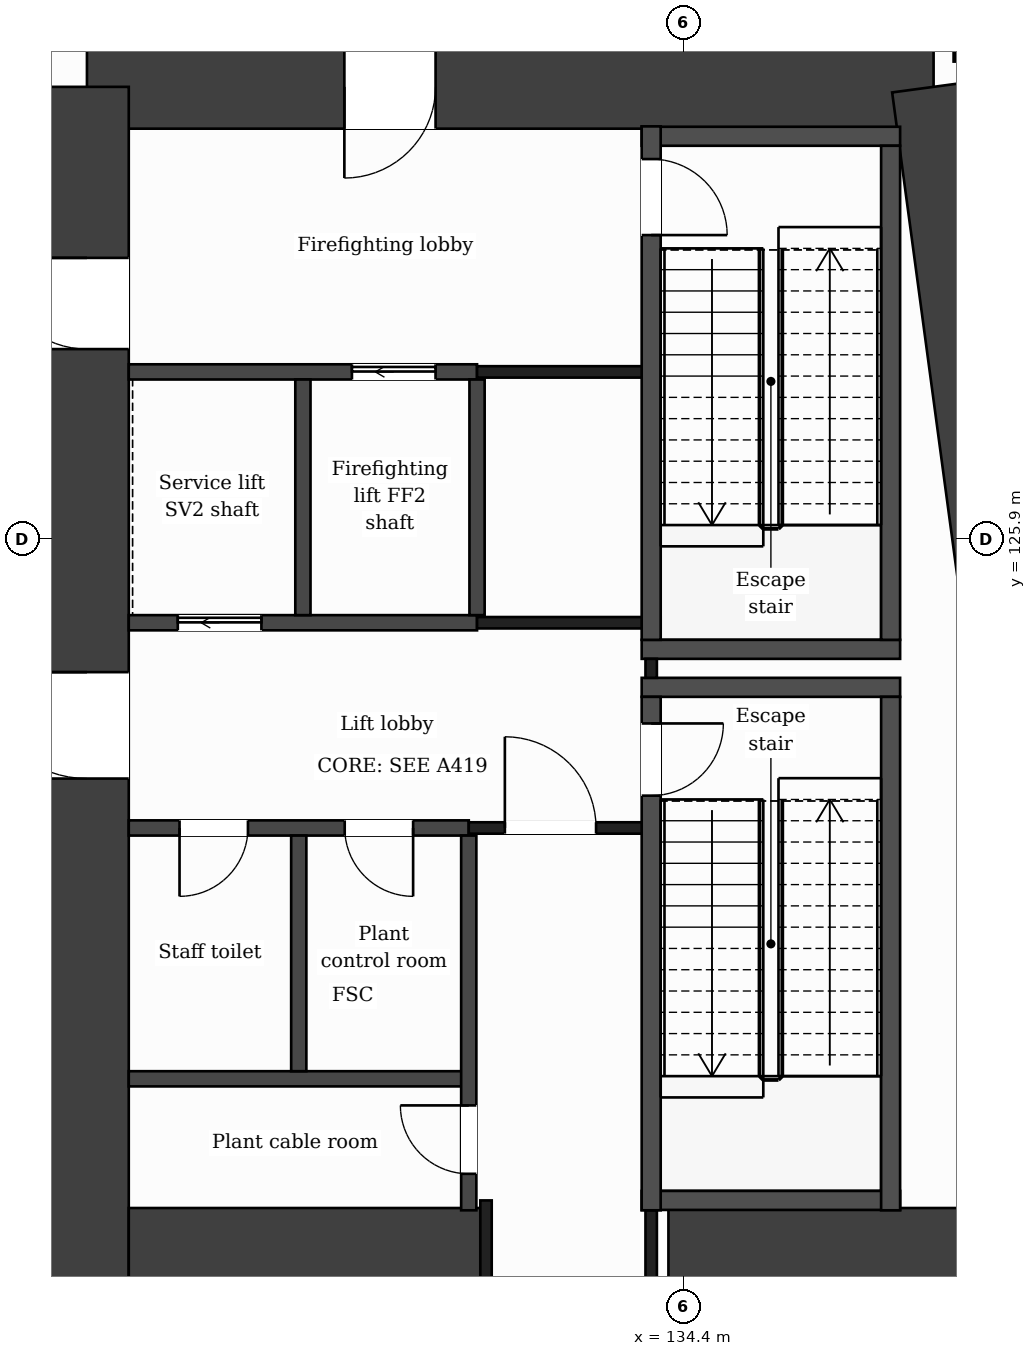
"""IFC4 building model, lengths in metres.
Left out: names, types, materials, properties, quantities, classifications, styles, units other than length and angle.
Written with IfcOpenShell. Run it as: python <this file> out.ifc"""

import sys

from ifc_helpers import new_model, si_unit, direction, frame, frame_2d, origin, place, context, subcontext, project, spatial, rectangle, extrude, element, fill, save


model = new_model("IFC4")
c1 = context("Model", 3, precision=1e-05, world=origin(), true_north=direction((0.0, 1.0)))
c2 = subcontext(c1, "Body", "Model", "MODEL_VIEW")
j1 = project(units=[si_unit("LENGTHUNIT", "METRE"), si_unit("PLANEANGLEUNIT", "RADIAN")], contexts=[c1])
p1 = place(None, origin())
s1 = spatial("IfcSite", under=j1, at=p1, CompositionType="ELEMENT")
p2 = place(p1, origin())
s2 = spatial("IfcBuilding", under=s1, at=p2, CompositionType="ELEMENT")
p3 = place(p2, frame((0.0, 0.0, 81.0)))
s3 = spatial("IfcBuildingStorey", under=s2, at=p3, CompositionType="ELEMENT", Elevation=81.0)
p4 = place(p3, frame((126.55, 131.85, 0.0), z_axis=(0.0, 0.0, 1.0), x_axis=(1.0, 0.0, 0.0)))
e1 = element("IfcWall", 1, at=p4, inside=s3, PredefinedType="SHEAR", context=c2, shape_type="SweptSolid", body=[
    extrude(rectangle(XDim=11.138, YDim=1.1, at=frame_2d((5.569, 0.0))), origin(), (0.0, 0.0, 1.0), 5.0),
])
p5 = place(p4, frame((3.386, 0.0, 0.0)))
e2 = element("IfcOpeningElement", 2, at=p5, cuts=e1, PredefinedType="OPENING", context=c2, shape_type="SweptSolid", body=[
    extrude(rectangle(XDim=1.2, YDim=2.1, at=frame_2d((0.6, 1.05))), frame((0.0, 0.56, 0.0), z_axis=(0.0, -1.0, 0.0), x_axis=(1.0, 0.0, 0.0)), (0.0, 0.0, 1.0), 1.12),
])
p6 = place(p3, frame((137.688, 131.85, 0.0), z_axis=(0.0, 0.0, 1.0), x_axis=(0.133411793472, -0.991060691059, 0.0)))
e3 = element("IfcWall", 3, at=p6, inside=s3, PredefinedType="SHEAR", context=c2, shape_type="SweptSolid", body=[
    extrude(rectangle(XDim=21.089, YDim=1.1, at=frame_2d((10.544, 0.0))), origin(), (0.0, 0.0, 1.0), 5.0),
])
p7 = place(p3, frame((126.55, 110.95, 0.0), z_axis=(0.0, 0.0, 1.0), x_axis=(0.0, 1.0, 0.0)))
e4 = element("IfcWall", 4, at=p7, inside=s3, PredefinedType="SHEAR", context=c2, shape_type="SweptSolid", body=[
    extrude(rectangle(XDim=20.9, YDim=1.1, at=frame_2d((10.45, 0.0))), origin(), (0.0, 0.0, 1.0), 5.0),
])
p8 = place(p7, frame((17.45, 0.0, 0.0)))
e5 = element("IfcOpeningElement", 5, at=p8, cuts=e4, PredefinedType="OPENING", context=c2, shape_type="SweptSolid", body=[
    extrude(rectangle(XDim=1.2, YDim=2.1, at=frame_2d((0.6, 1.05))), frame((0.0, 0.56, 0.0), z_axis=(0.0, -1.0, 0.0), x_axis=(1.0, 0.0, 0.0)), (0.0, 0.0, 1.0), 1.12),
])
p9 = place(p7, frame((11.8, 0.0, 0.0)))
e6 = element("IfcOpeningElement", 6, at=p9, cuts=e4, PredefinedType="OPENING", context=c2, shape_type="SweptSolid", body=[
    extrude(rectangle(XDim=1.4, YDim=2.1, at=frame_2d((0.7, 1.05))), frame((0.0, 0.56, 0.0), z_axis=(0.0, -1.0, 0.0), x_axis=(1.0, 0.0, 0.0)), (0.0, 0.0, 1.0), 1.12),
])
p10 = place(p3, frame((127.1, 116.55, 0.0), z_axis=(0.0, 0.0, 1.0), x_axis=(1.0, 0.0, 0.0)))
e7 = element("IfcWall", 7, at=p10, inside=s3, PredefinedType="SHEAR", context=c2, shape_type="SweptSolid", body=[
    extrude(rectangle(XDim=4.7, YDim=1.1, at=frame_2d((2.35, 0.0))), origin(), (0.0, 0.0, 1.0), 5.0),
])
p11 = place(p3, frame((134.2, 116.55, 0.0), z_axis=(0.0, 0.0, 1.0), x_axis=(1.0, 0.0, 0.0)))
e8 = element("IfcWall", 8, at=p11, inside=s3, PredefinedType="SHEAR", context=c2, shape_type="SweptSolid", body=[
    extrude(rectangle(XDim=5.077, YDim=1.1, at=frame_2d((2.539, 0.0))), origin(), (0.0, 0.0, 1.0), 5.0),
])
p12 = place(p3, frame((133.848, 117.2, 0.0), z_axis=(0.0, 0.0, 1.0), x_axis=(1.0, 0.0, 0.0)))
e9 = element("IfcWall", 9, at=p12, inside=s3, PredefinedType="PARTITIONING", context=c2, shape_type="SweptSolid", body=[
    extrude(rectangle(XDim=3.4, YDim=0.25, at=frame_2d((1.7, 0.0))), origin(), (0.0, 0.0, 1.0), 4.55),
])
p13 = place(p3, frame((127.1, 118.8, 0.0), z_axis=(0.0, 0.0, 1.0), x_axis=(1.0, 0.0, 0.0)))
e10 = element("IfcWall", 10, at=p13, inside=s3, PredefinedType="PARTITIONING", context=c2, shape_type="SweptSolid", body=[
    extrude(rectangle(XDim=4.473, YDim=0.2, at=frame_2d((2.236, 0.0))), origin(), (0.0, 0.0, 1.0), 4.55),
])
p14 = place(p3, frame((127.1, 122.1, 0.0), z_axis=(0.0, 0.0, 1.0), x_axis=(1.0, 0.0, 0.0)))
e11 = element("IfcWall", 11, at=p14, inside=s3, PredefinedType="PARTITIONING", context=c2, shape_type="SweptSolid", body=[
    extrude(rectangle(XDim=4.473, YDim=0.2, at=frame_2d((2.236, 0.0))), origin(), (0.0, 0.0, 1.0), 4.55),
])
p15 = place(p14, frame((2.841, 0.0, 0.0)))
e12 = element("IfcOpeningElement", 12, at=p15, cuts=e11, PredefinedType="OPENING", context=c2, shape_type="SweptSolid", body=[
    extrude(rectangle(XDim=0.9, YDim=2.1, at=frame_2d((0.45, 1.05))), frame((0.0, 0.11, 0.0), z_axis=(0.0, -1.0, 0.0), x_axis=(1.0, 0.0, 0.0)), (0.0, 0.0, 1.0), 0.22),
])
p16 = place(p14, frame((0.668, 0.0, 0.0)))
e13 = element("IfcOpeningElement", 13, at=p16, cuts=e11, PredefinedType="OPENING", context=c2, shape_type="SweptSolid", body=[
    extrude(rectangle(XDim=0.9, YDim=2.1, at=frame_2d((0.45, 1.05))), frame((0.0, 0.11, 0.0), z_axis=(0.0, -1.0, 0.0), x_axis=(1.0, 0.0, 0.0)), (0.0, 0.0, 1.0), 0.22),
])
p17 = place(p3, frame((131.573, 122.1, 0.0), z_axis=(0.0, 0.0, 1.0), x_axis=(1.0, 0.0, 0.0)))
e14 = element("IfcWall", 14, at=p17, inside=s3, PredefinedType="PARTITIONING", context=c2, shape_type="SweptSolid", body=[
    extrude(rectangle(XDim=2.4, YDim=0.15, at=frame_2d((1.2, 0.0))), origin(), (0.0, 0.0, 1.0), 4.55),
])
p18 = place(p17, frame((0.475, 0.0, 0.0)))
e15 = element("IfcOpeningElement", 15, at=p18, cuts=e14, PredefinedType="OPENING", context=c2, shape_type="SweptSolid", body=[
    extrude(rectangle(XDim=1.2, YDim=2.1, at=frame_2d((0.6, 1.05))), frame((0.0, 0.085, 0.0), z_axis=(0.0, -1.0, 0.0), x_axis=(1.0, 0.0, 0.0)), (0.0, 0.0, 1.0), 0.17),
])
for number, where, z_axis, x_axis in (
    (16, (133.848, 123.95, 0.0), (0.0, 0.0, 1.0), (1.0, 0.0, 0.0)),
    (17, (133.848, 124.45, 0.0), (0.0, 0.0, 1.0), (1.0, 0.0, 0.0)),
):
    element("IfcWall", number, at=place(p3, frame(where, z_axis=z_axis, x_axis=x_axis)), inside=s3, PredefinedType="PARTITIONING", context=c2, shape_type="SweptSolid", body=[
        extrude(rectangle(XDim=3.4, YDim=0.25, at=frame_2d((1.7, 0.0))), origin(), (0.0, 0.0, 1.0), 4.55),
    ])
p19 = place(p3, frame((127.1, 124.8, 0.0), z_axis=(0.0, 0.0, 1.0), x_axis=(1.0, 0.0, 0.0)))
e18 = element("IfcWall", 18, at=p19, inside=s3, PredefinedType="PARTITIONING", context=c2, shape_type="SweptSolid", body=[
    extrude(rectangle(XDim=4.582, YDim=0.2, at=frame_2d((2.291, 0.0))), origin(), (0.0, 0.0, 1.0), 4.55),
])
p20 = place(p19, frame((0.645, 0.0, 0.0)))
e19 = element("IfcOpeningElement", 19, at=p20, cuts=e18, PredefinedType="OPENING", context=c2, shape_type="SweptSolid", body=[
    extrude(rectangle(XDim=1.1, YDim=2.1, at=frame_2d((0.55, 1.05))), frame((0.0, 0.11, 0.0), z_axis=(0.0, -1.0, 0.0), x_axis=(1.0, 0.0, 0.0)), (0.0, 0.0, 1.0), 0.22),
])
p21 = place(p3, frame((131.682, 124.8, 0.0), z_axis=(0.0, 0.0, 1.0), x_axis=(1.0, 0.0, 0.0)))
e20 = element("IfcWall", 20, at=p21, inside=s3, PredefinedType="PARTITIONING", context=c2, shape_type="SweptSolid", body=[
    extrude(rectangle(XDim=2.416, YDim=0.15, at=frame_2d((1.208, 0.0))), origin(), (0.0, 0.0, 1.0), 4.55),
])
p22 = place(p3, frame((127.1, 128.1, 0.0), z_axis=(0.0, 0.0, 1.0), x_axis=(1.0, 0.0, 0.0)))
e21 = element("IfcWall", 21, at=p22, inside=s3, PredefinedType="PARTITIONING", context=c2, shape_type="SweptSolid", body=[
    extrude(rectangle(XDim=4.582, YDim=0.2, at=frame_2d((2.291, 0.0))), origin(), (0.0, 0.0, 1.0), 4.55),
])
p23 = place(p22, frame((2.936, 0.0, 0.0)))
e22 = element("IfcOpeningElement", 22, at=p23, cuts=e21, PredefinedType="OPENING", context=c2, shape_type="SweptSolid", body=[
    extrude(rectangle(XDim=1.1, YDim=2.1, at=frame_2d((0.55, 1.05))), frame((0.0, 0.11, 0.0), z_axis=(0.0, -1.0, 0.0), x_axis=(1.0, 0.0, 0.0)), (0.0, 0.0, 1.0), 0.22),
])
p24 = place(p3, frame((131.682, 128.1, 0.0), z_axis=(0.0, 0.0, 1.0), x_axis=(1.0, 0.0, 0.0)))
e23 = element("IfcWall", 23, at=p24, inside=s3, PredefinedType="PARTITIONING", context=c2, shape_type="SweptSolid", body=[
    extrude(rectangle(XDim=2.291, YDim=0.15, at=frame_2d((1.146, 0.0))), origin(), (0.0, 0.0, 1.0), 4.55),
])
p25 = place(p3, frame((133.848, 131.2, 0.0), z_axis=(0.0, 0.0, 1.0), x_axis=(1.0, 0.0, 0.0)))
e24 = element("IfcWall", 24, at=p25, inside=s3, PredefinedType="PARTITIONING", context=c2, shape_type="SweptSolid", body=[
    extrude(rectangle(XDim=3.4, YDim=0.25, at=frame_2d((1.7, 0.0))), origin(), (0.0, 0.0, 1.0), 4.55),
])
for number, where, z_axis, x_axis in (
    (25, (129.336, 118.9, 0.0), (0.0, 0.0, 1.0), (0.0, 1.0, 0.0)),
    (26, (129.391, 124.9, 0.0), (0.0, 0.0, 1.0), (0.0, 1.0, 0.0)),
):
    element("IfcWall", number, at=place(p3, frame(where, z_axis=z_axis, x_axis=x_axis)), inside=s3, PredefinedType="PARTITIONING", context=c2, shape_type="SweptSolid", body=[
        extrude(rectangle(XDim=3.1, YDim=0.2, at=frame_2d((1.55, 0.0))), origin(), (0.0, 0.0, 1.0), 4.55),
    ])
p26 = place(p3, frame((131.573, 117.07, 0.0), z_axis=(0.0, 0.0, 1.0), x_axis=(0.0, 1.0, 0.0)))
e27 = element("IfcWall", 27, at=p26, inside=s3, PredefinedType="PARTITIONING", context=c2, shape_type="SweptSolid", body=[
    extrude(rectangle(XDim=4.93, YDim=0.2, at=frame_2d((2.465, 0.0))), origin(), (0.0, 0.0, 1.0), 4.55),
])
p27 = place(p26, frame((0.48, 0.0, 0.0)))
e28 = element("IfcOpeningElement", 28, at=p27, cuts=e27, PredefinedType="OPENING", context=c2, shape_type="SweptSolid", body=[
    extrude(rectangle(XDim=0.9, YDim=2.1, at=frame_2d((0.45, 1.05))), frame((0.0, 0.11, 0.0), z_axis=(0.0, -1.0, 0.0), x_axis=(1.0, 0.0, 0.0)), (0.0, 0.0, 1.0), 0.22),
])
p28 = place(p3, frame((131.682, 124.9, 0.0), z_axis=(0.0, 0.0, 1.0), x_axis=(0.0, 1.0, 0.0)))
e29 = element("IfcWall", 29, at=p28, inside=s3, PredefinedType="PARTITIONING", context=c2, shape_type="SweptSolid", body=[
    extrude(rectangle(XDim=3.1, YDim=0.2, at=frame_2d((1.55, 0.0))), origin(), (0.0, 0.0, 1.0), 4.55),
])
p29 = place(p3, frame((131.8, 116.0, 0.0), z_axis=(0.0, 0.0, 1.0), x_axis=(0.0, 1.0, 0.0)))
e30 = element("IfcWall", 30, at=p29, inside=s3, PredefinedType="PARTITIONING", context=c2, shape_type="SweptSolid", body=[
    extrude(rectangle(XDim=1.2, YDim=0.15, at=frame_2d((0.6, 0.0))), origin(), (0.0, 0.0, 1.0), 4.55),
])
p30 = place(p3, frame((133.973, 116.0, 0.0), z_axis=(0.0, 0.0, 1.0), x_axis=(0.0, 1.0, 0.0)))
e31 = element("IfcWall", 31, at=p30, inside=s3, PredefinedType="PARTITIONING", context=c2, shape_type="SweptSolid", body=[
    extrude(rectangle(XDim=1.07, YDim=0.15, at=frame_2d((0.535, 0.0))), origin(), (0.0, 0.0, 1.0), 4.55),
])
p31 = place(p3, frame((133.973, 124.075, 0.0), z_axis=(0.0, 0.0, 1.0), x_axis=(0.0, 1.0, 0.0)))
e32 = element("IfcWall", 32, at=p31, inside=s3, PredefinedType="PARTITIONING", context=c2, shape_type="SweptSolid", body=[
    extrude(rectangle(XDim=0.25, YDim=0.15, at=frame_2d((0.125, 0.0))), origin(), (0.0, 0.0, 1.0), 4.55),
])
p32 = place(p3, frame((133.973, 117.07, 0.0), z_axis=(0.0, 0.0, 1.0), x_axis=(0.0, 1.0, 0.0)))
e33 = element("IfcWall", 33, at=p32, inside=s3, PredefinedType="PARTITIONING", context=c2, shape_type="SweptSolid", body=[
    extrude(rectangle(XDim=6.755, YDim=0.25, at=frame_2d((3.377, 0.0))), origin(), (0.0, 0.0, 1.0), 4.55),
])
p33 = place(p32, frame((5.455, 0.0, 0.0)))
e34 = element("IfcOpeningElement", 34, at=p33, cuts=e33, PredefinedType="OPENING", context=c2, shape_type="SweptSolid", body=[
    extrude(rectangle(XDim=0.95, YDim=2.1, at=frame_2d((0.475, 1.05))), frame((0.0, 0.135, 0.0), z_axis=(0.0, -1.0, 0.0), x_axis=(1.0, 0.0, 0.0)), (0.0, 0.0, 1.0), 0.27),
])
p34 = place(p3, frame((133.973, 124.575, 0.0), z_axis=(0.0, 0.0, 1.0), x_axis=(0.0, 1.0, 0.0)))
e35 = element("IfcWall", 35, at=p34, inside=s3, PredefinedType="PARTITIONING", context=c2, shape_type="SweptSolid", body=[
    extrude(rectangle(XDim=6.755, YDim=0.25, at=frame_2d((3.377, 0.0))), origin(), (0.0, 0.0, 1.0), 4.55),
])
p35 = place(p34, frame((5.325, 0.0, 0.0)))
e36 = element("IfcOpeningElement", 36, at=p35, cuts=e35, PredefinedType="OPENING", context=c2, shape_type="SweptSolid", body=[
    extrude(rectangle(XDim=1.0, YDim=2.1, at=frame_2d((0.5, 1.05))), frame((0.0, 0.135, 0.0), z_axis=(0.0, -1.0, 0.0), x_axis=(1.0, 0.0, 0.0)), (0.0, 0.0, 1.0), 0.27),
])
p36 = place(p3, frame((137.123, 117.07, 0.0), z_axis=(0.0, 0.0, 1.0), x_axis=(0.0, 1.0, 0.0)))
e37 = element("IfcWall", 37, at=p36, inside=s3, PredefinedType="PARTITIONING", context=c2, shape_type="SweptSolid", body=[
    extrude(rectangle(XDim=6.755, YDim=0.25, at=frame_2d((3.377, 0.0))), origin(), (0.0, 0.0, 1.0), 4.55),
])
p37 = place(p3, frame((137.123, 124.575, 0.0), z_axis=(0.0, 0.0, 1.0), x_axis=(0.0, 1.0, 0.0)))
e38 = element("IfcWall", 38, at=p37, inside=s3, PredefinedType="PARTITIONING", context=c2, shape_type="SweptSolid", body=[
    extrude(rectangle(XDim=6.5, YDim=0.25, at=frame_2d((3.25, 0.0))), origin(), (0.0, 0.0, 1.0), 4.55),
])
p38 = place(p18, origin())
e39 = element("IfcDoor", 39, at=p38, inside=s3, OperationType="SINGLE_SWING_LEFT", PredefinedType="DOOR", context=c2, shape_type="SweptSolid", body=[
    extrude(rectangle(XDim=1.2, YDim=2.1, at=frame_2d((0.6, 1.05))), frame((0.0, 0.025, 0.0), z_axis=(0.0, -1.0, 0.0), x_axis=(1.0, 0.0, 0.0)), (0.0, 0.0, 1.0), 0.05),
])
fill(e15, e39)
p39 = place(p23, origin())
e40 = element("IfcDoor", 40, at=p39, inside=s3, OperationType="SLIDING_TO_LEFT", PredefinedType="DOOR", context=c2, shape_type="SweptSolid", body=[
    extrude(rectangle(XDim=1.1, YDim=2.1, at=frame_2d((0.55, 1.05))), frame((0.0, 0.025, 0.0), z_axis=(0.0, -1.0, 0.0), x_axis=(1.0, 0.0, 0.0)), (0.0, 0.0, 1.0), 0.05),
])
fill(e22, e40)
p40 = place(p20, origin())
e41 = element("IfcDoor", 41, at=p40, inside=s3, OperationType="SLIDING_TO_LEFT", PredefinedType="DOOR", context=c2, shape_type="SweptSolid", body=[
    extrude(rectangle(XDim=1.1, YDim=2.1, at=frame_2d((0.55, 1.05))), frame((0.0, 0.025, 0.0), z_axis=(0.0, -1.0, 0.0), x_axis=(1.0, 0.0, 0.0)), (0.0, 0.0, 1.0), 0.05),
])
fill(e19, e41)
p41 = place(p15, origin())
e42 = element("IfcDoor", 42, at=p41, inside=s3, OperationType="SINGLE_SWING_RIGHT", PredefinedType="DOOR", context=c2, shape_type="SweptSolid", body=[
    extrude(rectangle(XDim=0.9, YDim=2.1, at=frame_2d((0.45, 1.05))), frame((0.0, 0.025, 0.0), z_axis=(0.0, -1.0, 0.0), x_axis=(1.0, 0.0, 0.0)), (0.0, 0.0, 1.0), 0.05),
])
fill(e12, e42)
p42 = place(p16, origin())
e43 = element("IfcDoor", 43, at=p42, inside=s3, OperationType="SINGLE_SWING_LEFT", PredefinedType="DOOR", context=c2, shape_type="SweptSolid", body=[
    extrude(rectangle(XDim=0.9, YDim=2.1, at=frame_2d((0.45, 1.05))), frame((0.0, 0.025, 0.0), z_axis=(0.0, -1.0, 0.0), x_axis=(1.0, 0.0, 0.0)), (0.0, 0.0, 1.0), 0.05),
])
fill(e13, e43)
p43 = place(p33, origin())
e44 = element("IfcDoor", 44, at=p43, inside=s3, OperationType="SINGLE_SWING_RIGHT", PredefinedType="DOOR", context=c2, shape_type="SweptSolid", body=[
    extrude(rectangle(XDim=0.95, YDim=2.1, at=frame_2d((0.475, 1.05))), frame((0.0, 0.025, 0.0), z_axis=(0.0, -1.0, 0.0), x_axis=(1.0, 0.0, 0.0)), (0.0, 0.0, 1.0), 0.05),
])
fill(e34, e44)
p44 = place(p35, origin())
e45 = element("IfcDoor", 45, at=p44, inside=s3, OperationType="SINGLE_SWING_LEFT", PredefinedType="DOOR", context=c2, shape_type="SweptSolid", body=[
    extrude(rectangle(XDim=1.0, YDim=2.1, at=frame_2d((0.5, 1.05))), frame((0.0, 0.025, 0.0), z_axis=(0.0, -1.0, 0.0), x_axis=(1.0, 0.0, 0.0)), (0.0, 0.0, 1.0), 0.05),
])
fill(e36, e45)
p45 = place(p27, origin())
e46 = element("IfcDoor", 46, at=p45, inside=s3, OperationType="SINGLE_SWING_RIGHT", PredefinedType="DOOR", context=c2, shape_type="SweptSolid", body=[
    extrude(rectangle(XDim=0.9, YDim=2.1, at=frame_2d((0.45, 1.05))), frame((0.0, 0.025, 0.0), z_axis=(0.0, -1.0, 0.0), x_axis=(1.0, 0.0, 0.0)), (0.0, 0.0, 1.0), 0.05),
])
fill(e28, e46)
p46 = place(p8, origin())
e47 = element("IfcDoor", 47, at=p46, inside=s3, OperationType="SINGLE_SWING_RIGHT", PredefinedType="DOOR", context=c2, shape_type="SweptSolid", body=[
    extrude(rectangle(XDim=1.2, YDim=2.1, at=frame_2d((0.6, 1.05))), frame((0.0, 0.025, 0.0), z_axis=(0.0, -1.0, 0.0), x_axis=(1.0, 0.0, 0.0)), (0.0, 0.0, 1.0), 0.05),
])
fill(e5, e47)
p47 = place(p5, origin())
e48 = element("IfcDoor", 48, at=p47, inside=s3, OperationType="SINGLE_SWING_LEFT", PredefinedType="DOOR", context=c2, shape_type="SweptSolid", body=[
    extrude(rectangle(XDim=1.2, YDim=2.1, at=frame_2d((0.6, 1.05))), frame((0.0, 0.025, 0.0), z_axis=(0.0, -1.0, 0.0), x_axis=(1.0, 0.0, 0.0)), (0.0, 0.0, 1.0), 0.05),
])
fill(e2, e48)
p48 = place(p9, origin())
e49 = element("IfcDoor", 49, at=p48, inside=s3, OperationType="SINGLE_SWING_RIGHT", PredefinedType="DOOR", context=c2, shape_type="SweptSolid", body=[
    extrude(rectangle(XDim=1.4, YDim=2.1, at=frame_2d((0.7, 1.05))), frame((0.0, 0.025, 0.0), z_axis=(0.0, -1.0, 0.0), x_axis=(1.0, 0.0, 0.0)), (0.0, 0.0, 1.0), 0.05),
])
fill(e6, e49)
save(model, sys.argv[1])
